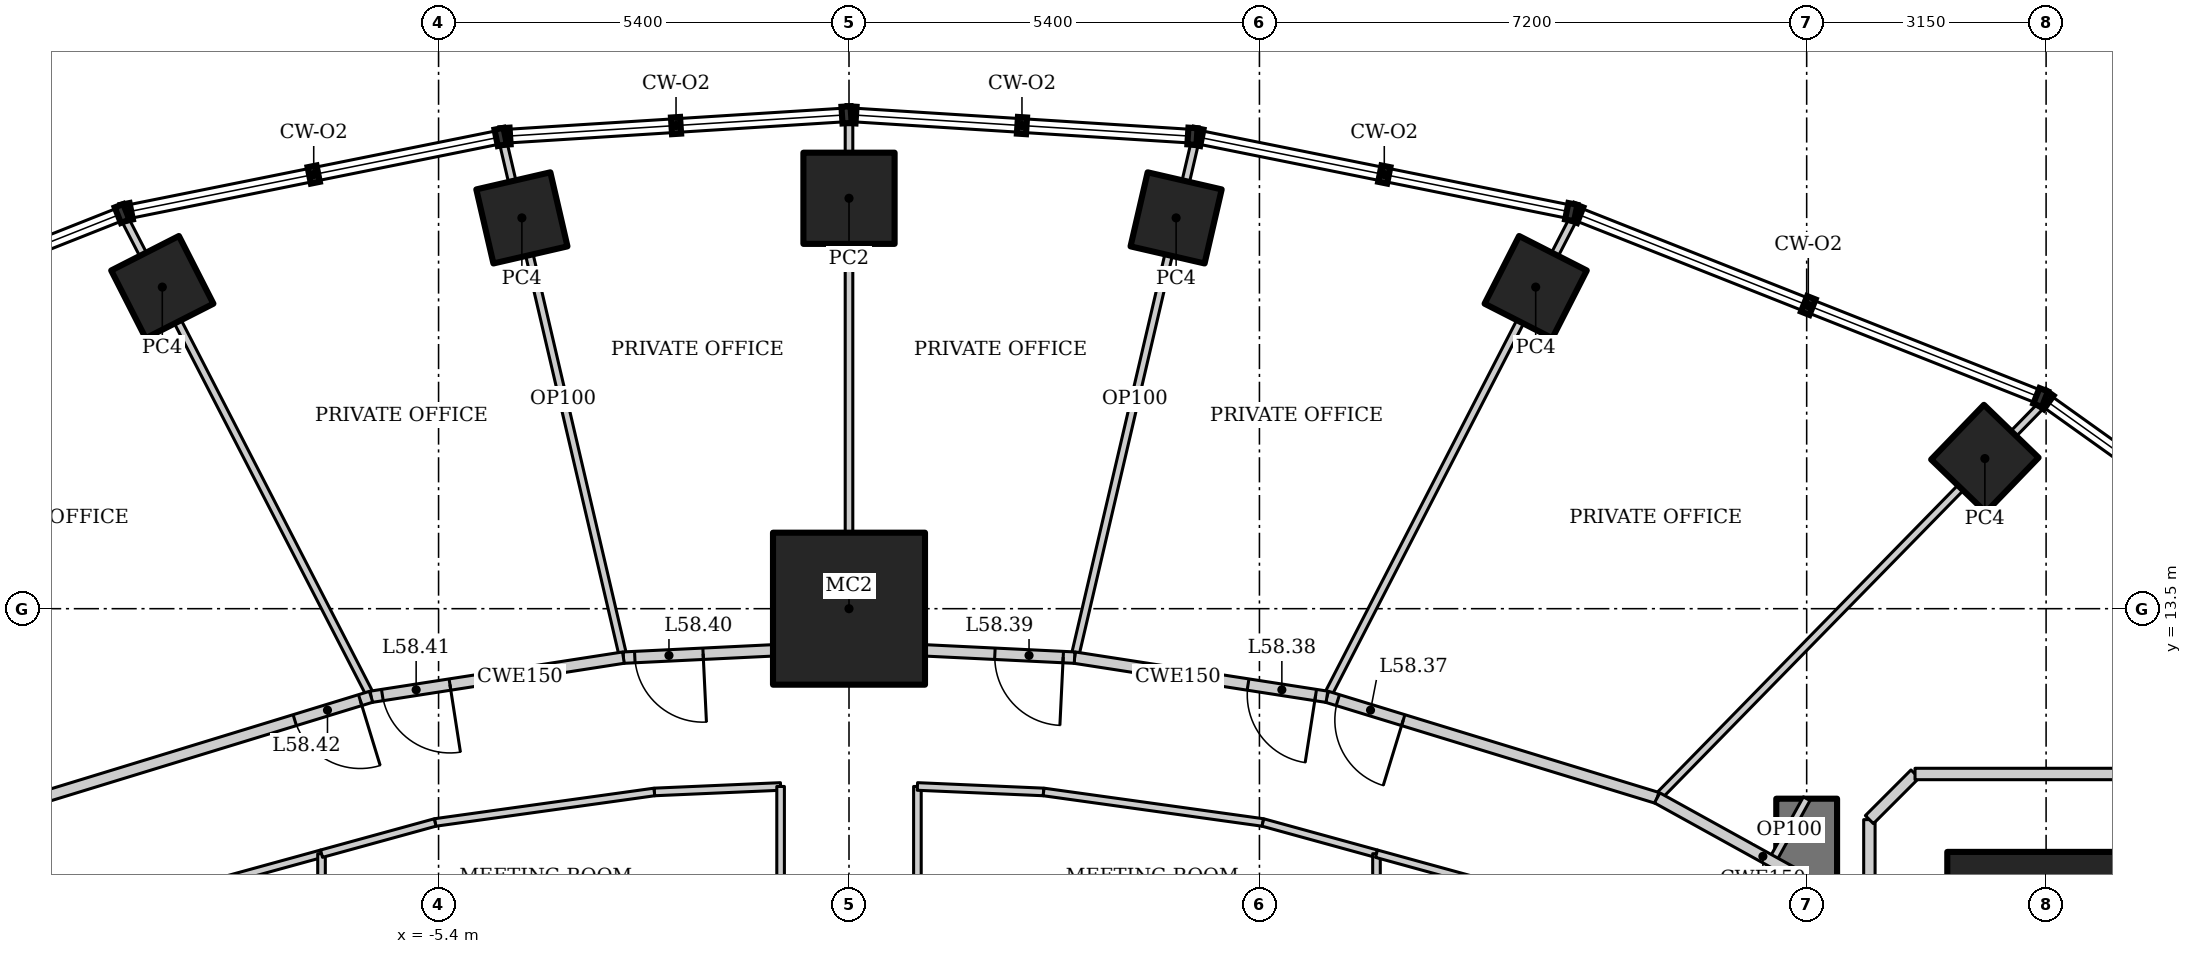
"""IFC4 building model, lengths in metres.
Left out: names, types, materials, properties, quantities, classifications, styles, units other than length and angle.
Written with IfcOpenShell. Run it as: python <this file> out.ifc"""

import sys

from ifc_helpers import new_model, si_unit, direction, frame, frame_2d, origin, origin_2d, place, context, subcontext, project, spatial, rectangle, hollow_rectangle, extrude, element, fill, save


model = new_model("IFC4")
c1 = context("Model", 3, precision=1e-05, world=origin(), true_north=direction((0.0, 1.0)))
c2 = subcontext(c1, "Body", "Model", "MODEL_VIEW")
j1 = project(units=[si_unit("LENGTHUNIT", "METRE"), si_unit("PLANEANGLEUNIT", "RADIAN")], contexts=[c1])
p1 = place(None, origin())
s1 = spatial("IfcSite", under=j1, at=p1, CompositionType="ELEMENT")
p2 = place(p1, origin())
s2 = spatial("IfcBuilding", under=s1, at=p2, CompositionType="ELEMENT")
p3 = place(p2, frame((0.0, 0.0, 249.4)))
s3 = spatial("IfcBuildingStorey", under=s2, at=p3, CompositionType="ELEMENT", Elevation=249.4)
p4 = place(p3, frame((15.75, 9.0, 0.0), z_axis=(0.0, 0.0, 1.0), x_axis=(1.0, 0.0, 0.0)))
e1 = element("IfcColumn", 1, at=p4, inside=s3, PredefinedType="COLUMN", context=c2, shape_type="SweptSolid", body=[
    extrude(hollow_rectangle(XDim=2.6, YDim=2.6, WallThickness=0.13, at=origin_2d()), origin(), (0.0, 0.0, 1.0), 4.2),
])
p5 = place(p3, frame((0.0, 13.5, 0.0), z_axis=(0.0, 0.0, 1.0), x_axis=(1.0, 0.0, 0.0)))
e2 = element("IfcColumn", 2, at=p5, inside=s3, PredefinedType="COLUMN", context=c2, shape_type="SweptSolid", body=[
    extrude(hollow_rectangle(XDim=2.0, YDim=2.0, WallThickness=0.17, at=origin_2d()), origin(), (0.0, 0.0, 1.0), 4.2),
])
for number, where, z_axis, x_axis in (
    (3, (14.944, 15.475, 0.0), (0.0, 0.0, 1.0), (0.695, 0.719, 0.0)),
    (4, (9.035, 17.731, 0.0), (0.0, 0.0, 1.0), (0.454, 0.891, 0.0)),
    (5, (4.304, 18.642, 0.0), (0.0, 0.0, 1.0), (0.225, 0.974, 0.0)),
):
    element("IfcColumn", number, at=place(p3, frame(where, z_axis=z_axis, x_axis=x_axis)), inside=s3, PredefinedType="COLUMN", context=c2, shape_type="SweptSolid", body=[
        extrude(hollow_rectangle(XDim=1.0, YDim=1.0, WallThickness=0.08, at=origin_2d()), origin(), (0.0, 0.0, 1.0), 4.2),
    ])
p6 = place(p3, frame((0.0, 18.9, 0.0), z_axis=(0.0, 0.0, 1.0), x_axis=(1.0, 0.0, 0.0)))
e6 = element("IfcColumn", 6, at=p6, inside=s3, PredefinedType="COLUMN", context=c2, shape_type="SweptSolid", body=[
    extrude(hollow_rectangle(XDim=1.2, YDim=1.2, WallThickness=0.1, at=origin_2d()), origin(), (0.0, 0.0, 1.0), 4.2),
])
for number, where, z_axis, x_axis in (
    (7, (-4.304, 18.642, 0.0), (0.0, 0.0, 1.0), (0.974, 0.225, 0.0)),
    (8, (-9.035, 17.731, 0.0), (0.0, 0.0, 1.0), (0.891, 0.454, 0.0)),
):
    element("IfcColumn", number, at=place(p3, frame(where, z_axis=z_axis, x_axis=x_axis)), inside=s3, PredefinedType="COLUMN", context=c2, shape_type="SweptSolid", body=[
        extrude(hollow_rectangle(XDim=1.0, YDim=1.0, WallThickness=0.08, at=origin_2d()), origin(), (0.0, 0.0, 1.0), 4.2),
    ])
p7 = place(p3, frame((12.6, -11.0, 0.0), z_axis=(0.0, 0.0, 1.0), x_axis=(0.0, 1.0, 0.0)))
e9 = element("IfcWall", 9, at=p7, inside=s3, PredefinedType="SHEAR", context=c2, shape_type="SweptSolid", body=[
    extrude(rectangle(XDim=22.0, YDim=0.8, at=frame_2d((11.0, 0.0))), origin(), (0.0, 0.0, 1.0), 4.2),
])
p8 = place(p7, frame((10.1, 0.0, 0.0)))
e10 = element("IfcOpeningElement", 10, at=p8, cuts=e9, PredefinedType="OPENING", context=c2, shape_type="SweptSolid", body=[
    extrude(rectangle(XDim=1.8, YDim=2.1, at=frame_2d((0.9, 1.05))), frame((0.0, 0.41, 0.0), z_axis=(0.0, -1.0, 0.0), x_axis=(1.0, 0.0, 0.0)), (0.0, 0.0, 1.0), 0.82),
])
p9 = place(p3, frame((15.709, 16.199, 0.0), z_axis=(0.0, 0.0, 1.0), x_axis=(-0.699362525935, -0.714767135029, 0.0)))
e11 = element("IfcWall", 11, at=p9, inside=s3, PredefinedType="PARTITIONING", context=c2, shape_type="SweptSolid", body=[
    extrude(rectangle(XDim=7.259, YDim=0.1, at=frame_2d((3.629, 0.0))), origin(), (0.0, 0.0, 1.0), 3.41),
])
p10 = place(p3, frame((9.54, 18.65, 0.0), z_axis=(0.0, 0.0, 1.0), x_axis=(-0.45810402165, -0.88889859115, 0.0)))
e12 = element("IfcWall", 12, at=p10, inside=s3, PredefinedType="PARTITIONING", context=c2, shape_type="SweptSolid", body=[
    extrude(rectangle(XDim=7.098, YDim=0.1, at=frame_2d((3.549, 0.0))), origin(), (0.0, 0.0, 1.0), 3.108),
])
p11 = place(p3, frame((4.556, 19.657, 0.0), z_axis=(0.0, 0.0, 1.0), x_axis=(-0.22733791689, -0.973815933092, 0.0)))
e13 = element("IfcWall", 13, at=p11, inside=s3, PredefinedType="PARTITIONING", context=c2, shape_type="SweptSolid", body=[
    extrude(rectangle(XDim=6.984, YDim=0.1, at=frame_2d((3.492, 0.0))), origin(), (0.0, 0.0, 1.0), 3.108),
])
p12 = place(p3, frame((0.0, 19.945, 0.0), z_axis=(0.0, 0.0, 1.0), x_axis=(0.0, -1.0, 0.0)))
e14 = element("IfcWall", 14, at=p12, inside=s3, PredefinedType="PARTITIONING", context=c2, shape_type="SweptSolid", body=[
    extrude(rectangle(XDim=6.945, YDim=0.1, at=frame_2d((3.472, 0.0))), origin(), (0.0, 0.0, 1.0), 3.644),
])
p13 = place(p3, frame((-4.556, 19.657, 0.0), z_axis=(0.0, 0.0, 1.0), x_axis=(0.22733791689, -0.973815933092, 0.0)))
e15 = element("IfcWall", 15, at=p13, inside=s3, PredefinedType="PARTITIONING", context=c2, shape_type="SweptSolid", body=[
    extrude(rectangle(XDim=6.984, YDim=0.1, at=frame_2d((3.492, 0.0))), origin(), (0.0, 0.0, 1.0), 3.108),
])
p14 = place(p3, frame((-9.54, 18.65, 0.0), z_axis=(0.0, 0.0, 1.0), x_axis=(0.45810402165, -0.88889859115, 0.0)))
e16 = element("IfcWall", 16, at=p14, inside=s3, PredefinedType="PARTITIONING", context=c2, shape_type="SweptSolid", body=[
    extrude(rectangle(XDim=7.098, YDim=0.1, at=frame_2d((3.549, 0.0))), origin(), (0.0, 0.0, 1.0), 3.108),
])
p15 = place(p3, frame((10.633, 11.01, 0.0), z_axis=(0.0, 0.0, 1.0), x_axis=(-0.956185837153, 0.292760388079, 0.0)))
e17 = element("IfcWall", 17, at=p15, inside=s3, PredefinedType="PARTITIONING", context=c2, shape_type="SweptSolid", body=[
    extrude(rectangle(XDim=4.544, YDim=0.15, at=frame_2d((2.272, 0.0))), origin(), (0.0, 0.0, 1.0), 4.05),
])
p16 = place(p15, frame((3.494, 0.0, 0.0)))
e18 = element("IfcOpeningElement", 18, at=p16, cuts=e17, PredefinedType="OPENING", context=c2, shape_type="SweptSolid", body=[
    extrude(rectangle(XDim=0.9, YDim=2.1, at=frame_2d((0.45, 1.05))), frame((0.0, 0.085, 0.0), z_axis=(0.0, -1.0, 0.0), x_axis=(1.0, 0.0, 0.0)), (0.0, 0.0, 1.0), 0.17),
])
p17 = place(p3, frame((6.288, 12.341, 0.0), z_axis=(0.0, 0.0, 1.0), x_axis=(-0.988174283057, 0.153334882869, 0.0)))
e19 = element("IfcWall", 19, at=p17, inside=s3, PredefinedType="PARTITIONING", context=c2, shape_type="SweptSolid", body=[
    extrude(rectangle(XDim=3.36, YDim=0.15, at=frame_2d((1.68, 0.0))), origin(), (0.0, 0.0, 1.0), 4.05),
])
p18 = place(p17, frame((0.15, 0.0, 0.0)))
e20 = element("IfcOpeningElement", 20, at=p18, cuts=e19, PredefinedType="OPENING", context=c2, shape_type="SweptSolid", body=[
    extrude(rectangle(XDim=0.9, YDim=2.1, at=frame_2d((0.45, 1.05))), frame((0.0, 0.085, 0.0), z_axis=(0.0, -1.0, 0.0), x_axis=(1.0, 0.0, 0.0)), (0.0, 0.0, 1.0), 0.17),
])
p19 = place(p3, frame((2.968, 12.856, 0.0), z_axis=(0.0, 0.0, 1.0), x_axis=(-0.998824412818, 0.04847465687, 0.0)))
e21 = element("IfcWall", 21, at=p19, inside=s3, PredefinedType="PARTITIONING", context=c2, shape_type="SweptSolid", body=[
    extrude(rectangle(XDim=2.971, YDim=0.15, at=frame_2d((1.486, 0.0))), origin(), (0.0, 0.0, 1.0), 4.05),
])
p20 = place(p19, frame((0.15, 0.0, 0.0)))
e22 = element("IfcOpeningElement", 22, at=p20, cuts=e21, PredefinedType="OPENING", context=c2, shape_type="SweptSolid", body=[
    extrude(rectangle(XDim=0.9, YDim=2.1, at=frame_2d((0.45, 1.05))), frame((0.0, 0.085, 0.0), z_axis=(0.0, -1.0, 0.0), x_axis=(1.0, 0.0, 0.0)), (0.0, 0.0, 1.0), 0.17),
])
p21 = place(p3, frame((0.0, 13.0, 0.0), z_axis=(0.0, 0.0, 1.0), x_axis=(-0.998824412818, -0.04847465687, 0.0)))
e23 = element("IfcWall", 23, at=p21, inside=s3, PredefinedType="PARTITIONING", context=c2, shape_type="SweptSolid", body=[
    extrude(rectangle(XDim=2.971, YDim=0.15, at=frame_2d((1.486, 0.0))), origin(), (0.0, 0.0, 1.0), 4.05),
])
p22 = place(p21, frame((1.921, 0.0, 0.0)))
e24 = element("IfcOpeningElement", 24, at=p22, cuts=e23, PredefinedType="OPENING", context=c2, shape_type="SweptSolid", body=[
    extrude(rectangle(XDim=0.9, YDim=2.1, at=frame_2d((0.45, 1.05))), frame((0.0, 0.085, 0.0), z_axis=(0.0, -1.0, 0.0), x_axis=(1.0, 0.0, 0.0)), (0.0, 0.0, 1.0), 0.17),
])
p23 = place(p3, frame((-2.968, 12.856, 0.0), z_axis=(0.0, 0.0, 1.0), x_axis=(-0.988174283057, -0.153334882869, 0.0)))
e25 = element("IfcWall", 25, at=p23, inside=s3, PredefinedType="PARTITIONING", context=c2, shape_type="SweptSolid", body=[
    extrude(rectangle(XDim=3.36, YDim=0.15, at=frame_2d((1.68, 0.0))), origin(), (0.0, 0.0, 1.0), 4.05),
])
p24 = place(p23, frame((2.31, 0.0, 0.0)))
e26 = element("IfcOpeningElement", 26, at=p24, cuts=e25, PredefinedType="OPENING", context=c2, shape_type="SweptSolid", body=[
    extrude(rectangle(XDim=0.9, YDim=2.1, at=frame_2d((0.45, 1.05))), frame((0.0, 0.085, 0.0), z_axis=(0.0, -1.0, 0.0), x_axis=(1.0, 0.0, 0.0)), (0.0, 0.0, 1.0), 0.17),
])
p25 = place(p3, frame((-6.288, 12.341, 0.0), z_axis=(0.0, 0.0, 1.0), x_axis=(-0.956185837153, -0.292760388079, 0.0)))
e27 = element("IfcWall", 27, at=p25, inside=s3, PredefinedType="PARTITIONING", context=c2, shape_type="SweptSolid", body=[
    extrude(rectangle(XDim=4.544, YDim=0.15, at=frame_2d((2.272, 0.0))), origin(), (0.0, 0.0, 1.0), 4.05),
])
p26 = place(p25, frame((0.15, 0.0, 0.0)))
e28 = element("IfcOpeningElement", 28, at=p26, cuts=e27, PredefinedType="OPENING", context=c2, shape_type="SweptSolid", body=[
    extrude(rectangle(XDim=0.9, YDim=2.1, at=frame_2d((0.45, 1.05))), frame((0.0, 0.085, 0.0), z_axis=(0.0, -1.0, 0.0), x_axis=(1.0, 0.0, 0.0)), (0.0, 0.0, 1.0), 0.17),
])
p27 = place(p3, frame((0.9, 8.8, 0.0), z_axis=(0.0, 0.0, 1.0), x_axis=(0.0, 1.0, 0.0)))
e29 = element("IfcWall", 29, at=p27, inside=s3, PredefinedType="PARTITIONING", context=c2, shape_type="SweptSolid", body=[
    extrude(rectangle(XDim=2.361, YDim=0.1, at=frame_2d((1.18, 0.0))), origin(), (0.0, 0.0, 1.0), 4.05),
])
p28 = place(p3, frame((0.9, 11.161, 0.0), z_axis=(0.0, 0.0, 1.0), x_axis=(0.999053939397, -0.043488230303, 0.0)))
e30 = element("IfcWall", 30, at=p28, inside=s3, PredefinedType="PARTITIONING", context=c2, shape_type="SweptSolid", body=[
    extrude(rectangle(XDim=1.662, YDim=0.1, at=frame_2d((0.831, 0.0))), origin(), (0.0, 0.0, 1.0), 4.05),
])
p29 = place(p3, frame((2.56, 11.089, 0.0), z_axis=(0.0, 0.0, 1.0), x_axis=(0.99045099049, -0.137865280027, 0.0)))
e31 = element("IfcWall", 31, at=p29, inside=s3, PredefinedType="PARTITIONING", context=c2, shape_type="SweptSolid", body=[
    extrude(rectangle(XDim=2.913, YDim=0.1, at=frame_2d((1.457, 0.0))), origin(), (0.0, 0.0, 1.0), 4.05),
])
p30 = place(p3, frame((5.445, 10.687, 0.0), z_axis=(0.0, 0.0, 1.0), x_axis=(0.964227536736, -0.265075946476, 0.0)))
e32 = element("IfcWall", 32, at=p30, inside=s3, PredefinedType="PARTITIONING", context=c2, shape_type="SweptSolid", body=[
    extrude(rectangle(XDim=1.55, YDim=0.1, at=frame_2d((0.775, 0.0))), origin(), (0.0, 0.0, 1.0), 4.05),
])
p31 = place(p3, frame((6.94, 10.276, 0.0), z_axis=(0.0, 0.0, 1.0), x_axis=(0.0, -1.0, 0.0)))
e33 = element("IfcWall", 33, at=p31, inside=s3, PredefinedType="PARTITIONING", context=c2, shape_type="SweptSolid", body=[
    extrude(rectangle(XDim=2.476, YDim=0.1, at=frame_2d((1.238, 0.0))), origin(), (0.0, 0.0, 1.0), 4.05),
])
for number, where, z_axis, x_axis in (
    (34, (6.94, 10.276, 0.0), (0.0, 0.0, 1.0), (0.964, -0.265, 0.0)),
    (35, (-9.298, 9.628, 0.0), (0.0, 0.0, 1.0), (0.964, 0.265, 0.0)),
):
    element("IfcWall", number, at=place(p3, frame(where, z_axis=z_axis, x_axis=x_axis)), inside=s3, PredefinedType="PARTITIONING", context=c2, shape_type="SweptSolid", body=[
        extrude(rectangle(XDim=2.445, YDim=0.1, at=frame_2d((1.223, 0.0))), origin(), (0.0, 0.0, 1.0), 4.05),
    ])
p32 = place(p3, frame((-6.94, 10.276, 0.0), z_axis=(0.0, 0.0, 1.0), x_axis=(0.0, -1.0, 0.0)))
e36 = element("IfcWall", 36, at=p32, inside=s3, PredefinedType="PARTITIONING", context=c2, shape_type="SweptSolid", body=[
    extrude(rectangle(XDim=2.476, YDim=0.1, at=frame_2d((1.238, 0.0))), origin(), (0.0, 0.0, 1.0), 4.05),
])
p33 = place(p3, frame((-5.445, 10.687, 0.0), z_axis=(0.0, 0.0, 1.0), x_axis=(0.99045099049, 0.137865280027, 0.0)))
e37 = element("IfcWall", 37, at=p33, inside=s3, PredefinedType="PARTITIONING", context=c2, shape_type="SweptSolid", body=[
    extrude(rectangle(XDim=2.913, YDim=0.1, at=frame_2d((1.457, 0.0))), origin(), (0.0, 0.0, 1.0), 4.05),
])
p34 = place(p3, frame((-2.56, 11.089, 0.0), z_axis=(0.0, 0.0, 1.0), x_axis=(0.999053939397, 0.043488230303, 0.0)))
e38 = element("IfcWall", 38, at=p34, inside=s3, PredefinedType="PARTITIONING", context=c2, shape_type="SweptSolid", body=[
    extrude(rectangle(XDim=1.662, YDim=0.1, at=frame_2d((0.831, 0.0))), origin(), (0.0, 0.0, 1.0), 4.05),
])
p35 = place(p3, frame((-0.9, 11.161, 0.0), z_axis=(0.0, 0.0, 1.0), x_axis=(0.0, -1.0, 0.0)))
e39 = element("IfcWall", 39, at=p35, inside=s3, PredefinedType="PARTITIONING", context=c2, shape_type="SweptSolid", body=[
    extrude(rectangle(XDim=2.361, YDim=0.1, at=frame_2d((1.18, 0.0))), origin(), (0.0, 0.0, 1.0), 4.05),
])
p36 = place(p3, frame((-6.94, 10.276, 0.0), z_axis=(0.0, 0.0, 1.0), x_axis=(0.964227536736, 0.265075946476, 0.0)))
e40 = element("IfcWall", 40, at=p36, inside=s3, PredefinedType="PARTITIONING", context=c2, shape_type="SweptSolid", body=[
    extrude(rectangle(XDim=1.55, YDim=0.1, at=frame_2d((0.775, 0.0))), origin(), (0.0, 0.0, 1.0), 4.05),
])
p37 = place(p3, frame((12.6, 11.0, 0.0), z_axis=(0.0, 0.0, 1.0), x_axis=(-0.484103558985, -0.875010710893, 0.0)))
e41 = element("IfcWall", 41, at=p37, inside=s3, PredefinedType="PARTITIONING", context=c2, shape_type="SweptSolid", body=[
    extrude(rectangle(XDim=0.943, YDim=0.1, at=frame_2d((0.472, 0.0))), origin(), (0.0, 0.0, 1.0), 4.05),
])
p38 = place(p3, frame((13.415, 9.472, 0.0), z_axis=(0.0, 0.0, 1.0), x_axis=(-0.875072100837, 0.483992580869, 0.0)))
e42 = element("IfcWall", 42, at=p38, inside=s3, PredefinedType="PARTITIONING", context=c2, shape_type="SweptSolid", body=[
    extrude(rectangle(XDim=3.179, YDim=0.15, at=frame_2d((1.59, 0.0))), origin(), (0.0, 0.0, 1.0), 4.05),
])
p39 = place(p3, frame((13.425, 9.586, 0.0), z_axis=(0.0, 0.0, 1.0), x_axis=(0.0, 1.0, 0.0)))
e43 = element("IfcWall", 43, at=p39, inside=s3, PredefinedType="PARTITIONING", context=c2, shape_type="SweptSolid", body=[
    extrude(rectangle(XDim=1.138, YDim=0.15, at=frame_2d((0.569, 0.0))), origin(), (0.0, 0.0, 1.0), 4.05),
])
p40 = place(p3, frame((13.425, 10.725, 0.0), z_axis=(0.0, 0.0, 1.0), x_axis=(0.707106781187, 0.707106781187, 0.0)))
e44 = element("IfcWall", 44, at=p40, inside=s3, PredefinedType="PARTITIONING", context=c2, shape_type="SweptSolid", body=[
    extrude(rectangle(XDim=0.849, YDim=0.15, at=frame_2d((0.425, 0.0))), origin(), (0.0, 0.0, 1.0), 4.05),
])
p41 = place(p3, frame((14.025, 11.325, 0.0), z_axis=(0.0, 0.0, 1.0), x_axis=(1.0, 0.0, 0.0)))
e45 = element("IfcWall", 45, at=p41, inside=s3, PredefinedType="PARTITIONING", context=c2, shape_type="SweptSolid", body=[
    extrude(rectangle(XDim=3.449, YDim=0.15, at=frame_2d((1.725, 0.0))), origin(), (0.0, 0.0, 1.0), 4.05),
])
p42 = place(p16, origin())
e46 = element("IfcDoor", 46, at=p42, inside=s3, OperationType="SINGLE_SWING_LEFT", PredefinedType="DOOR", context=c2, shape_type="SweptSolid", body=[
    extrude(rectangle(XDim=0.9, YDim=2.1, at=frame_2d((0.45, 1.05))), frame((0.0, 0.025, 0.0), z_axis=(0.0, -1.0, 0.0), x_axis=(1.0, 0.0, 0.0)), (0.0, 0.0, 1.0), 0.05),
])
fill(e18, e46)
p43 = place(p18, origin())
e47 = element("IfcDoor", 47, at=p43, inside=s3, OperationType="SINGLE_SWING_LEFT", PredefinedType="DOOR", context=c2, shape_type="SweptSolid", body=[
    extrude(rectangle(XDim=0.9, YDim=2.1, at=frame_2d((0.45, 1.05))), frame((0.0, 0.025, 0.0), z_axis=(0.0, -1.0, 0.0), x_axis=(1.0, 0.0, 0.0)), (0.0, 0.0, 1.0), 0.05),
])
fill(e20, e47)
p44 = place(p20, origin())
e48 = element("IfcDoor", 48, at=p44, inside=s3, OperationType="SINGLE_SWING_LEFT", PredefinedType="DOOR", context=c2, shape_type="SweptSolid", body=[
    extrude(rectangle(XDim=0.9, YDim=2.1, at=frame_2d((0.45, 1.05))), frame((0.0, 0.025, 0.0), z_axis=(0.0, -1.0, 0.0), x_axis=(1.0, 0.0, 0.0)), (0.0, 0.0, 1.0), 0.05),
])
fill(e22, e48)
p45 = place(p22, origin())
e49 = element("IfcDoor", 49, at=p45, inside=s3, OperationType="SINGLE_SWING_LEFT", PredefinedType="DOOR", context=c2, shape_type="SweptSolid", body=[
    extrude(rectangle(XDim=0.9, YDim=2.1, at=frame_2d((0.45, 1.05))), frame((0.0, 0.025, 0.0), z_axis=(0.0, -1.0, 0.0), x_axis=(1.0, 0.0, 0.0)), (0.0, 0.0, 1.0), 0.05),
])
fill(e24, e49)
p46 = place(p24, origin())
e50 = element("IfcDoor", 50, at=p46, inside=s3, OperationType="SINGLE_SWING_LEFT", PredefinedType="DOOR", context=c2, shape_type="SweptSolid", body=[
    extrude(rectangle(XDim=0.9, YDim=2.1, at=frame_2d((0.45, 1.05))), frame((0.0, 0.025, 0.0), z_axis=(0.0, -1.0, 0.0), x_axis=(1.0, 0.0, 0.0)), (0.0, 0.0, 1.0), 0.05),
])
fill(e26, e50)
p47 = place(p26, origin())
e51 = element("IfcDoor", 51, at=p47, inside=s3, OperationType="SINGLE_SWING_LEFT", PredefinedType="DOOR", context=c2, shape_type="SweptSolid", body=[
    extrude(rectangle(XDim=0.9, YDim=2.1, at=frame_2d((0.45, 1.05))), frame((0.0, 0.025, 0.0), z_axis=(0.0, -1.0, 0.0), x_axis=(1.0, 0.0, 0.0)), (0.0, 0.0, 1.0), 0.05),
])
fill(e28, e51)
save(model, sys.argv[1])
